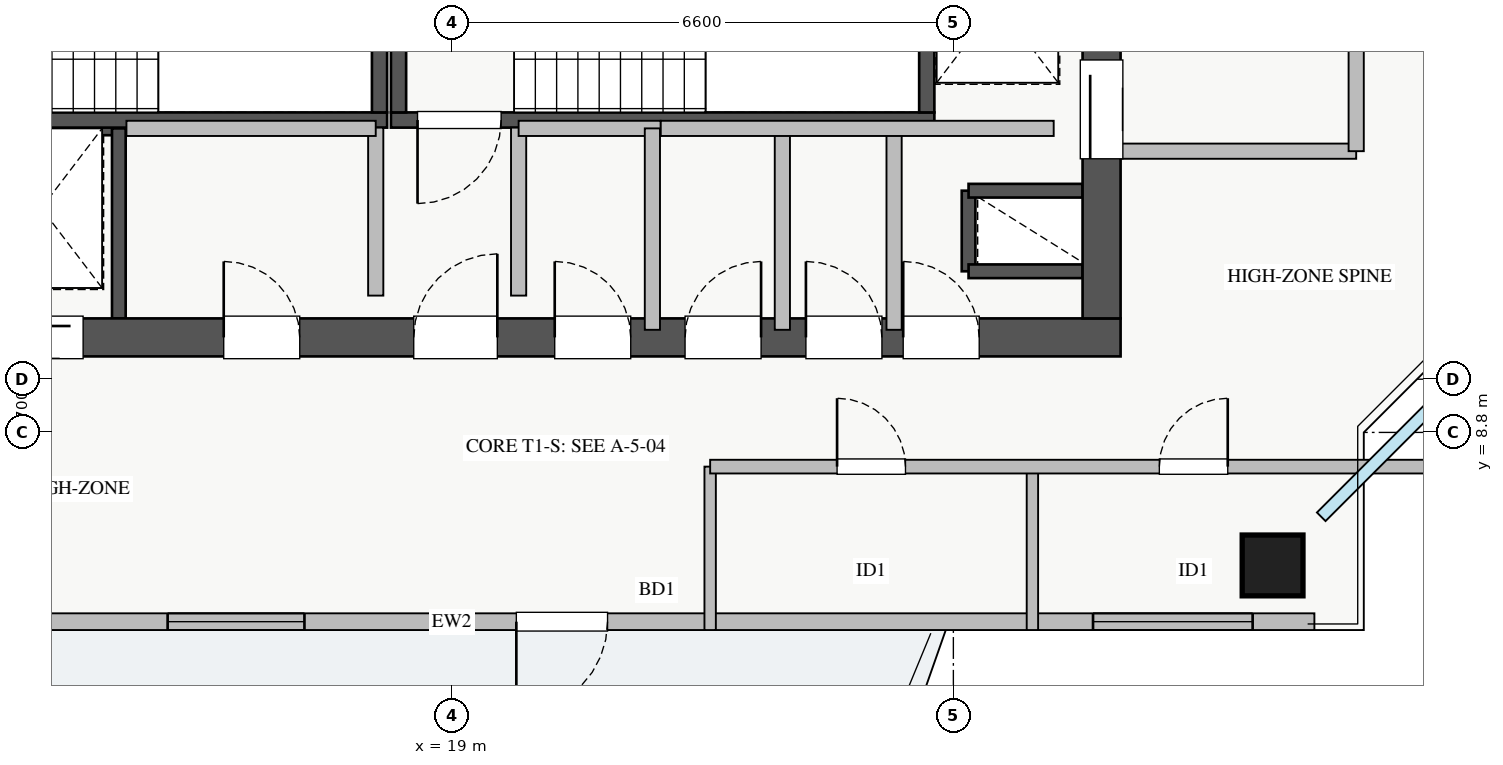
"""IFC4 building model, lengths in metres.
Left out: names, types, materials, properties, quantities, classifications, styles, units other than length and angle.
Written with IfcOpenShell. Run it as: python <this file> out.ifc"""

import sys

from ifc_helpers import new_model, si_unit, direction, frame, frame_2d, origin, origin_2d, place, context, subcontext, project, spatial, rectangle, extrude, source, transform, mapped, element, fill, save


model = new_model("IFC4")
c1 = context("Model", 3, precision=1e-05, world=origin(), true_north=direction((0.0, 1.0)))
c2 = subcontext(c1, "Body", "Model", "MODEL_VIEW")
j1 = project(units=[si_unit("LENGTHUNIT", "METRE"), si_unit("PLANEANGLEUNIT", "RADIAN")], contexts=[c1])
p1 = place(None, origin())
s1 = spatial("IfcSite", under=j1, at=p1, CompositionType="ELEMENT")
p2 = place(p1, origin())
s2 = spatial("IfcBuilding", under=s1, at=p2, CompositionType="ELEMENT")
p3 = place(p2, frame((0.0, 0.0, 223.0)))
s3 = spatial("IfcBuildingStorey", under=s2, at=p3, CompositionType="ELEMENT", Elevation=223.0)
p4 = place(p3, frame((12.68, 12.8, 0.0), z_axis=(0.0, 0.0, 1.0), x_axis=(1.0, 0.0, 0.0)))
e1 = element("IfcWall", 1, at=p4, inside=s3, PredefinedType="SHEAR", context=c2, shape_type="SweptSolid", body=[
    extrude(rectangle(XDim=1.94, YDim=0.18, at=frame_2d((0.97, 0.0))), origin(), (0.0, 0.0, 1.0), 3.07),
])
p5 = place(p3, frame((14.62, 10.3, 0.0), z_axis=(0.0, 0.0, 1.0), x_axis=(0.0, 1.0, 0.0)))
e2 = element("IfcWall", 2, at=p5, inside=s3, PredefinedType="SHEAR", context=c2, shape_type="SweptSolid", body=[
    extrude(rectangle(XDim=2.5, YDim=0.18, at=frame_2d((1.25, 0.0))), origin(), (0.0, 0.0, 1.0), 3.07),
])
p6 = place(p3, frame((25.8, 10.92, 0.0), z_axis=(0.0, 0.0, 1.0), x_axis=(0.0, 1.0, 0.0)))
e3 = element("IfcWall", 3, at=p6, inside=s3, PredefinedType="SHEAR", context=c2, shape_type="SweptSolid", body=[
    extrude(rectangle(XDim=1.06, YDim=0.18, at=frame_2d((0.53, 0.0))), origin(), (0.0, 0.0, 1.0), 3.07),
])
for number, where, z_axis, x_axis in (
    (4, (25.8, 11.98, 0.0), (0.0, 0.0, 1.0), (1.0, 0.0, 0.0)),
    (5, (25.8, 10.92, 0.0), (0.0, 0.0, 1.0), (1.0, 0.0, 0.0)),
):
    element("IfcWall", number, at=place(p3, frame(where, z_axis=z_axis, x_axis=x_axis)), inside=s3, PredefinedType="SHEAR", context=c2, shape_type="SweptSolid", body=[
        extrude(rectangle(XDim=1.5, YDim=0.18, at=frame_2d((0.75, 0.0))), origin(), (0.0, 0.0, 1.0), 3.07),
    ])
p7 = place(p3, frame((10.7, 12.91, 0.0), z_axis=(0.0, 0.0, 1.0), x_axis=(1.0, 0.0, 0.0)))
e6 = element("IfcWall", 6, at=p7, inside=s3, PredefinedType="SHEAR", context=c2, shape_type="SweptSolid", body=[
    extrude(rectangle(XDim=7.45, YDim=0.2, at=frame_2d((3.725, 0.0))), origin(), (0.0, 0.0, 1.0), 3.25),
])
p8 = place(p7, frame((0.35, 0.0, 0.0)))
e7 = element("IfcOpeningElement", 7, at=p8, cuts=e6, PredefinedType="OPENING", context=c2, shape_type="SweptSolid", body=[
    extrude(rectangle(XDim=1.1, YDim=2.05, at=frame_2d((0.55, 1.025))), frame((0.0, 0.11, 0.0), z_axis=(0.0, -1.0, 0.0), x_axis=(1.0, 0.0, 0.0)), (0.0, 0.0, 1.0), 0.22),
])
p9 = place(p3, frame((18.05, 13.01, 0.0), z_axis=(0.0, 0.0, 1.0), x_axis=(0.0, 1.0, 0.0)))
e8 = element("IfcWall", 8, at=p9, inside=s3, PredefinedType="SHEAR", context=c2, shape_type="SweptSolid", body=[
    extrude(rectangle(XDim=2.94, YDim=0.2, at=frame_2d((1.47, 0.0))), origin(), (0.0, 0.0, 1.0), 3.25),
])
p10 = place(p3, frame((18.2, 12.91, 0.0), z_axis=(0.0, 0.0, 1.0), x_axis=(1.0, 0.0, 0.0)))
e9 = element("IfcWall", 9, at=p10, inside=s3, PredefinedType="SHEAR", context=c2, shape_type="SweptSolid", body=[
    extrude(rectangle(XDim=7.15, YDim=0.2, at=frame_2d((3.575, 0.0))), origin(), (0.0, 0.0, 1.0), 3.25),
])
p11 = place(p10, frame((0.35, 0.0, 0.0)))
e10 = element("IfcOpeningElement", 10, at=p11, cuts=e9, PredefinedType="OPENING", context=c2, shape_type="SweptSolid", body=[
    extrude(rectangle(XDim=1.1, YDim=2.05, at=frame_2d((0.55, 1.025))), frame((0.0, 0.11, 0.0), z_axis=(0.0, -1.0, 0.0), x_axis=(1.0, 0.0, 0.0)), (0.0, 0.0, 1.0), 0.22),
])
for number, where, z_axis, x_axis in (
    (11, (18.3, 13.01, 0.0), (0.0, 0.0, 1.0), (0.0, 1.0, 0.0)),
    (12, (25.25, 13.01, 0.0), (0.0, 0.0, 1.0), (0.0, 1.0, 0.0)),
):
    element("IfcWall", number, at=place(p3, frame(where, z_axis=z_axis, x_axis=x_axis)), inside=s3, PredefinedType="SHEAR", context=c2, shape_type="SweptSolid", body=[
        extrude(rectangle(XDim=2.94, YDim=0.2, at=frame_2d((1.47, 0.0))), origin(), (0.0, 0.0, 1.0), 3.25),
    ])
p12 = place(p3, frame((10.2, 10.05, 0.0), z_axis=(0.0, 0.0, 1.0), x_axis=(1.0, 0.0, 0.0)))
e13 = element("IfcWall", 13, at=p12, inside=s3, PredefinedType="SHEAR", context=c2, shape_type="SweptSolid", body=[
    extrude(rectangle(XDim=17.6, YDim=0.5, at=frame_2d((8.8, 0.0))), origin(), (0.0, 0.0, 1.0), 3.25),
])
p13 = place(p12, frame((1.15, 0.0, 0.0)))
e14 = element("IfcOpeningElement", 14, at=p13, cuts=e13, PredefinedType="OPENING", context=c2, shape_type="SweptSolid", body=[
    extrude(rectangle(XDim=1.1, YDim=2.05, at=frame_2d((0.55, 1.025))), frame((0.0, 0.26, 0.0), z_axis=(0.0, -1.0, 0.0), x_axis=(1.0, 0.0, 0.0)), (0.0, 0.0, 1.0), 0.52),
])
p14 = place(p12, frame((8.3, 0.0, 0.0)))
e15 = element("IfcOpeningElement", 15, at=p14, cuts=e13, PredefinedType="OPENING", context=c2, shape_type="SweptSolid", body=[
    extrude(rectangle(XDim=1.1, YDim=2.05, at=frame_2d((0.55, 1.025))), frame((0.0, 0.26, 0.0), z_axis=(0.0, -1.0, 0.0), x_axis=(1.0, 0.0, 0.0)), (0.0, 0.0, 1.0), 0.52),
])
p15 = place(p12, frame((2.85, 0.0, 0.0)))
e16 = element("IfcOpeningElement", 16, at=p15, cuts=e13, PredefinedType="OPENING", context=c2, shape_type="SweptSolid", body=[
    extrude(rectangle(XDim=1.1, YDim=2.05, at=frame_2d((0.55, 1.025))), frame((0.0, 0.26, 0.0), z_axis=(0.0, -1.0, 0.0), x_axis=(1.0, 0.0, 0.0)), (0.0, 0.0, 1.0), 0.52),
])
p16 = place(p12, frame((5.8, 0.0, 0.0)))
e17 = element("IfcOpeningElement", 17, at=p16, cuts=e13, PredefinedType="OPENING", context=c2, shape_type="SweptSolid", body=[
    extrude(rectangle(XDim=1.0, YDim=2.05, at=frame_2d((0.5, 1.025))), frame((0.0, 0.26, 0.0), z_axis=(0.0, -1.0, 0.0), x_axis=(1.0, 0.0, 0.0)), (0.0, 0.0, 1.0), 0.52),
])
p17 = place(p12, frame((14.74, 0.0, 0.0)))
e18 = element("IfcOpeningElement", 18, at=p17, cuts=e13, PredefinedType="OPENING", context=c2, shape_type="SweptSolid", body=[
    extrude(rectangle(XDim=1.0, YDim=2.05, at=frame_2d((0.5, 1.025))), frame((0.0, 0.26, 0.0), z_axis=(0.0, -1.0, 0.0), x_axis=(1.0, 0.0, 0.0)), (0.0, 0.0, 1.0), 0.52),
])
p18 = place(p12, frame((10.155, 0.0, 0.0)))
e19 = element("IfcOpeningElement", 19, at=p18, cuts=e13, PredefinedType="OPENING", context=c2, shape_type="SweptSolid", body=[
    extrude(rectangle(XDim=1.0, YDim=2.05, at=frame_2d((0.5, 1.025))), frame((0.0, 0.26, 0.0), z_axis=(0.0, -1.0, 0.0), x_axis=(1.0, 0.0, 0.0)), (0.0, 0.0, 1.0), 0.52),
])
p19 = place(p12, frame((11.87, 0.0, 0.0)))
e20 = element("IfcOpeningElement", 20, at=p19, cuts=e13, PredefinedType="OPENING", context=c2, shape_type="SweptSolid", body=[
    extrude(rectangle(XDim=1.0, YDim=2.05, at=frame_2d((0.5, 1.025))), frame((0.0, 0.26, 0.0), z_axis=(0.0, -1.0, 0.0), x_axis=(1.0, 0.0, 0.0)), (0.0, 0.0, 1.0), 0.52),
])
p20 = place(p12, frame((13.46, 0.0, 0.0)))
e21 = element("IfcOpeningElement", 21, at=p20, cuts=e13, PredefinedType="OPENING", context=c2, shape_type="SweptSolid", body=[
    extrude(rectangle(XDim=1.0, YDim=2.05, at=frame_2d((0.5, 1.025))), frame((0.0, 0.26, 0.0), z_axis=(0.0, -1.0, 0.0), x_axis=(1.0, 0.0, 0.0)), (0.0, 0.0, 1.0), 0.52),
])
p21 = place(p3, frame((27.55, 10.3, 0.0), z_axis=(0.0, 0.0, 1.0), x_axis=(0.0, 1.0, 0.0)))
e22 = element("IfcWall", 22, at=p21, inside=s3, PredefinedType="SHEAR", context=c2, shape_type="SweptSolid", body=[
    extrude(rectangle(XDim=6.2, YDim=0.5, at=frame_2d((3.1, 0.0))), origin(), (0.0, 0.0, 1.0), 3.25),
])
p22 = place(p21, frame((2.1, 0.0, 0.0)))
e23 = element("IfcOpeningElement", 23, at=p22, cuts=e22, PredefinedType="OPENING", context=c2, shape_type="SweptSolid", body=[
    extrude(rectangle(XDim=1.3, YDim=2.05, at=frame_2d((0.65, 1.025))), frame((0.0, 0.26, 0.0), z_axis=(0.0, -1.0, 0.0), x_axis=(1.0, 0.0, 0.0)), (0.0, 0.0, 1.0), 0.52),
])
m1 = source(origin(), c2, "Body", "SweptSolid", [
    extrude(rectangle(XDim=0.8, YDim=0.8, at=origin_2d()), origin(), (0.0, 0.0, 1.0), 3.25),
])
p23 = place(p3, frame((29.8, 7.05, 0.0), z_axis=(0.0, 0.0, 1.0), x_axis=(1.0, 0.0, 0.0)))
e24 = element("IfcColumn", 24, at=p23, inside=s3, PredefinedType="COLUMN", context=c2, shape_type="MappedRepresentation", body=[
    mapped(m1, transform((0.0, 0.0, 0.0), x_axis=(1.0, 0.0, 0.0), y_axis=(0.0, 1.0, 0.0), z_axis=(0.0, 0.0, 1.0), scale=1.0)),
])
p24 = place(p3, frame((7.65, 6.31, 0.0), z_axis=(0.0, 0.0, 1.0), x_axis=(1.0, 0.0, 0.0)))
e25 = element("IfcWall", 25, at=p24, inside=s3, PredefinedType="STANDARD", context=c2, shape_type="SweptSolid", body=[
    extrude(rectangle(XDim=22.7, YDim=0.22, at=frame_2d((11.35, 0.0))), origin(), (0.0, 0.0, 1.0), 2.61),
])
p25 = place(p24, frame((12.2, 0.0, 0.0)))
e26 = element("IfcOpeningElement", 26, at=p25, cuts=e25, PredefinedType="OPENING", context=c2, shape_type="SweptSolid", body=[
    extrude(rectangle(XDim=1.2, YDim=2.1, at=frame_2d((0.6, 1.05))), frame((0.0, 0.12, 0.0), z_axis=(0.0, -1.0, 0.0), x_axis=(1.0, 0.0, 0.0)), (0.0, 0.0, 1.0), 0.24),
])
p26 = place(p24, frame((1.637, 0.0, 0.9)))
e27 = element("IfcOpeningElement", 27, at=p26, cuts=e25, PredefinedType="OPENING", context=c2, shape_type="SweptSolid", body=[
    extrude(rectangle(XDim=2.4, YDim=1.48, at=frame_2d((1.2, 0.74))), frame((0.0, 0.12, 0.0), z_axis=(0.0, -1.0, 0.0), x_axis=(1.0, 0.0, 0.0)), (0.0, 0.0, 1.0), 0.24),
])
p27 = place(p24, frame((7.612, 0.0, 0.9)))
e28 = element("IfcOpeningElement", 28, at=p27, cuts=e25, PredefinedType="OPENING", context=c2, shape_type="SweptSolid", body=[
    extrude(rectangle(XDim=1.8, YDim=1.45, at=frame_2d((0.9, 0.725))), frame((0.0, 0.12, 0.0), z_axis=(0.0, -1.0, 0.0), x_axis=(1.0, 0.0, 0.0)), (0.0, 0.0, 1.0), 0.24),
])
p28 = place(p24, frame((19.788, 0.0, 0.9)))
e29 = element("IfcOpeningElement", 29, at=p28, cuts=e25, PredefinedType="OPENING", context=c2, shape_type="SweptSolid", body=[
    extrude(rectangle(XDim=2.1, YDim=1.5, at=frame_2d((1.05, 0.75))), frame((0.0, 0.12, 0.0), z_axis=(0.0, -1.0, 0.0), x_axis=(1.0, 0.0, 0.0)), (0.0, 0.0, 1.0), 0.24),
])
p29 = place(p3, frame((27.8, 12.5, 0.0), z_axis=(0.0, 0.0, 1.0), x_axis=(1.0, 0.0, 0.0)))
e30 = element("IfcWall", 30, at=p29, inside=s3, PredefinedType="PARTITIONING", context=c2, shape_type="SweptSolid", body=[
    extrude(rectangle(XDim=3.1, YDim=0.2, at=frame_2d((1.55, 0.0))), origin(), (0.0, 0.0, 1.0), 2.265),
])
p30 = place(p3, frame((30.9, 12.5, 0.0), z_axis=(0.0, 0.0, 1.0), x_axis=(0.0, 1.0, 0.0)))
e31 = element("IfcWall", 31, at=p30, inside=s3, PredefinedType="PARTITIONING", context=c2, shape_type="SweptSolid", body=[
    extrude(rectangle(XDim=3.9, YDim=0.2, at=frame_2d((1.95, 0.0))), origin(), (0.0, 0.0, 1.0), 3.07),
])
p31 = place(p30, frame((1.4, 0.0, 0.0)))
e32 = element("IfcOpeningElement", 32, at=p31, cuts=e31, PredefinedType="OPENING", context=c2, shape_type="SweptSolid", body=[
    extrude(rectangle(XDim=1.1, YDim=2.05, at=frame_2d((0.55, 1.025))), frame((0.0, 0.11, 0.0), z_axis=(0.0, -1.0, 0.0), x_axis=(1.0, 0.0, 0.0)), (0.0, 0.0, 1.0), 0.22),
])
for number, where, z_axis, x_axis in (
    (33, (18.0, 10.6, 0.0), (0.0, 0.0, 1.0), (0.0, 1.0, 0.0)),
    (34, (19.88, 10.6, 0.0), (0.0, 0.0, 1.0), (0.0, 1.0, 0.0)),
):
    element("IfcWall", number, at=place(p3, frame(where, z_axis=z_axis, x_axis=x_axis)), inside=s3, PredefinedType="PARTITIONING", context=c2, shape_type="SweptSolid", body=[
        extrude(rectangle(XDim=2.21, YDim=0.2, at=frame_2d((1.105, 0.0))), origin(), (0.0, 0.0, 1.0), 3.07),
    ])
p32 = place(p3, frame((14.72, 12.8, 0.0), z_axis=(0.0, 0.0, 1.0), x_axis=(1.0, 0.0, 0.0)))
e35 = element("IfcWall", 35, at=p32, inside=s3, PredefinedType="PARTITIONING", context=c2, shape_type="SweptSolid", body=[
    extrude(rectangle(XDim=3.28, YDim=0.2, at=frame_2d((1.64, 0.0))), origin(), (0.0, 0.0, 1.0), 3.07),
])
p33 = place(p3, frame((24.82, 10.15, 0.0), z_axis=(0.0, 0.0, 1.0), x_axis=(0.0, 1.0, 0.0)))
e36 = element("IfcWall", 36, at=p33, inside=s3, PredefinedType="PARTITIONING", context=c2, shape_type="SweptSolid", body=[
    extrude(rectangle(XDim=2.65, YDim=0.2, at=frame_2d((1.325, 0.0))), origin(), (0.0, 0.0, 1.0), 3.07),
])
p34 = place(p3, frame((19.88, 12.8, 0.0), z_axis=(0.0, 0.0, 1.0), x_axis=(1.0, 0.0, 0.0)))
e37 = element("IfcWall", 37, at=p34, inside=s3, PredefinedType="PARTITIONING", context=c2, shape_type="SweptSolid", body=[
    extrude(rectangle(XDim=1.87, YDim=0.2, at=frame_2d((0.935, 0.0))), origin(), (0.0, 0.0, 1.0), 3.07),
])
for number, where, z_axis, x_axis in (
    (38, (21.64, 10.15, 0.0), (0.0, 0.0, 1.0), (0.0, 1.0, 0.0)),
    (39, (23.35, 10.15, 0.0), (0.0, 0.0, 1.0), (0.0, 1.0, 0.0)),
):
    element("IfcWall", number, at=place(p3, frame(where, z_axis=z_axis, x_axis=x_axis)), inside=s3, PredefinedType="PARTITIONING", context=c2, shape_type="SweptSolid", body=[
        extrude(rectangle(XDim=2.65, YDim=0.2, at=frame_2d((1.325, 0.0))), origin(), (0.0, 0.0, 1.0), 3.07),
    ])
p35 = place(p3, frame((21.75, 12.8, 0.0), z_axis=(0.0, 0.0, 1.0), x_axis=(1.0, 0.0, 0.0)))
e40 = element("IfcWall", 40, at=p35, inside=s3, PredefinedType="PARTITIONING", context=c2, shape_type="SweptSolid", body=[
    extrude(rectangle(XDim=5.17, YDim=0.2, at=frame_2d((2.585, 0.0))), origin(), (0.0, 0.0, 1.0), 3.07),
])
for number, where, z_axis, x_axis in (
    (41, (22.4, 6.2, 0.0), (0.0, 0.0, 1.0), (0.0, 1.0, 0.0)),
    (42, (26.64, 6.2, 0.0), (0.0, 0.0, 1.0), (0.0, 1.0, 0.0)),
):
    element("IfcWall", number, at=place(p3, frame(where, z_axis=z_axis, x_axis=x_axis)), inside=s3, PredefinedType="PARTITIONING", context=c2, shape_type="SweptSolid", body=[
        extrude(rectangle(XDim=2.15, YDim=0.15, at=frame_2d((1.075, 0.0))), origin(), (0.0, 0.0, 1.0), 3.07),
    ])
p36 = place(p3, frame((22.4, 8.35, 0.0), z_axis=(0.0, 0.0, 1.0), x_axis=(1.0, 0.0, 0.0)))
e43 = element("IfcWall", 43, at=p36, inside=s3, PredefinedType="PARTITIONING", context=c2, shape_type="SweptSolid", body=[
    extrude(rectangle(XDim=10.05, YDim=0.18, at=frame_2d((5.025, 0.0))), origin(), (0.0, 0.0, 1.0), 3.07),
])
p37 = place(p36, frame((1.67, 0.0, 0.0)))
e44 = element("IfcOpeningElement", 44, at=p37, cuts=e43, PredefinedType="OPENING", context=c2, shape_type="SweptSolid", body=[
    extrude(rectangle(XDim=0.9, YDim=2.05, at=frame_2d((0.45, 1.025))), frame((0.0, 0.1, 0.0), z_axis=(0.0, -1.0, 0.0), x_axis=(1.0, 0.0, 0.0)), (0.0, 0.0, 1.0), 0.2),
])
p38 = place(p36, frame((5.91, 0.0, 0.0)))
e45 = element("IfcOpeningElement", 45, at=p38, cuts=e43, PredefinedType="OPENING", context=c2, shape_type="SweptSolid", body=[
    extrude(rectangle(XDim=0.9, YDim=2.05, at=frame_2d((0.45, 1.025))), frame((0.0, 0.1, 0.0), z_axis=(0.0, -1.0, 0.0), x_axis=(1.0, 0.0, 0.0)), (0.0, 0.0, 1.0), 0.2),
])
m2 = source(origin(), c2, "Body", "SweptSolid", [
    extrude(rectangle(XDim=1.2, YDim=2.1, at=frame_2d((0.6, 1.05))), frame((0.0, 0.025, 0.0), z_axis=(0.0, -1.0, 0.0), x_axis=(1.0, 0.0, 0.0)), (0.0, 0.0, 1.0), 0.05),
])
p39 = place(p25, frame((1.2, 0.0, 0.0), z_axis=(0.0, 0.0, 1.0), x_axis=(-1.0, 0.0, 0.0)))
e46 = element("IfcDoor", 46, at=p39, inside=s3, OperationType="SINGLE_SWING_LEFT", PredefinedType="DOOR", context=c2, shape_type="MappedRepresentation", body=[
    mapped(m2, transform((0.0, 0.0, 0.0), x_axis=(1.0, 0.0, 0.0), y_axis=(0.0, 1.0, 0.0), z_axis=(0.0, 0.0, 1.0), scale=1.0)),
])
fill(e26, e46)
m3 = source(origin(), c2, "Body", "SweptSolid", [
    extrude(rectangle(XDim=1.8, YDim=1.45, at=frame_2d((0.9, 0.725))), frame((0.0, 0.03, 0.0), z_axis=(0.0, -1.0, 0.0), x_axis=(1.0, 0.0, 0.0)), (0.0, 0.0, 1.0), 0.06),
])
p40 = place(p27, origin())
e47 = element("IfcWindow", 47, at=p40, inside=s3, PartitioningType="DOUBLE_PANEL_VERTICAL", PredefinedType="WINDOW", context=c2, shape_type="MappedRepresentation", body=[
    mapped(m3, transform((0.0, 0.0, 0.0), x_axis=(1.0, 0.0, 0.0), y_axis=(0.0, 1.0, 0.0), z_axis=(0.0, 0.0, 1.0), scale=1.0)),
])
fill(e28, e47)
m4 = source(origin(), c2, "Body", "SweptSolid", [
    extrude(rectangle(XDim=2.1, YDim=1.5, at=frame_2d((1.05, 0.75))), frame((0.0, 0.03, 0.0), z_axis=(0.0, -1.0, 0.0), x_axis=(1.0, 0.0, 0.0)), (0.0, 0.0, 1.0), 0.06),
])
p41 = place(p28, origin())
e48 = element("IfcWindow", 48, at=p41, inside=s3, PartitioningType="TRIPLE_PANEL_VERTICAL", PredefinedType="WINDOW", context=c2, shape_type="MappedRepresentation", body=[
    mapped(m4, transform((0.0, 0.0, 0.0), x_axis=(1.0, 0.0, 0.0), y_axis=(0.0, 1.0, 0.0), z_axis=(0.0, 0.0, 1.0), scale=1.0)),
])
fill(e29, e48)
m5 = source(origin(), c2, "Body", "SweptSolid", [
    extrude(rectangle(XDim=1.3, YDim=2.05, at=frame_2d((0.65, 1.025))), frame((0.0, 0.025, 0.0), z_axis=(0.0, -1.0, 0.0), x_axis=(1.0, 0.0, 0.0)), (0.0, 0.0, 1.0), 0.05),
])
p42 = place(p22, origin())
e49 = element("IfcDoor", 49, at=p42, inside=s3, OperationType="SLIDING_TO_RIGHT", PredefinedType="DOOR", context=c2, shape_type="MappedRepresentation", body=[
    mapped(m5, transform((0.0, 0.0, 0.0), x_axis=(1.0, 0.0, 0.0), y_axis=(0.0, 1.0, 0.0), z_axis=(0.0, 0.0, 1.0), scale=1.0)),
])
fill(e23, e49)
m6 = source(origin(), c2, "Body", "SweptSolid", [
    extrude(rectangle(XDim=1.1, YDim=2.05, at=frame_2d((0.55, 1.025))), frame((0.0, 0.025, 0.0), z_axis=(0.0, -1.0, 0.0), x_axis=(1.0, 0.0, 0.0)), (0.0, 0.0, 1.0), 0.05),
])
p43 = place(p14, origin())
e50 = element("IfcDoor", 50, at=p43, inside=s3, OperationType="SINGLE_SWING_RIGHT", PredefinedType="DOOR", context=c2, shape_type="MappedRepresentation", body=[
    mapped(m6, transform((0.0, 0.0, 0.0), x_axis=(1.0, 0.0, 0.0), y_axis=(0.0, 1.0, 0.0), z_axis=(0.0, 0.0, 1.0), scale=1.0)),
])
fill(e15, e50)
p44 = place(p11, frame((1.1, 0.0, 0.0), z_axis=(0.0, 0.0, 1.0), x_axis=(-1.0, 0.0, 0.0)))
e51 = element("IfcDoor", 51, at=p44, inside=s3, OperationType="SINGLE_SWING_LEFT", PredefinedType="DOOR", context=c2, shape_type="MappedRepresentation", body=[
    mapped(m6, transform((0.0, 0.0, 0.0), x_axis=(1.0, 0.0, 0.0), y_axis=(0.0, 1.0, 0.0), z_axis=(0.0, 0.0, 1.0), scale=1.0)),
])
fill(e10, e51)
p45 = place(p15, origin())
e52 = element("IfcDoor", 52, at=p45, inside=s3, OperationType="SLIDING_TO_RIGHT", PredefinedType="DOOR", context=c2, shape_type="MappedRepresentation", body=[
    mapped(m6, transform((0.0, 0.0, 0.0), x_axis=(1.0, 0.0, 0.0), y_axis=(0.0, 1.0, 0.0), z_axis=(0.0, 0.0, 1.0), scale=1.0)),
])
fill(e16, e52)
m7 = source(origin(), c2, "Body", "SweptSolid", [
    extrude(rectangle(XDim=1.0, YDim=2.05, at=frame_2d((0.5, 1.025))), frame((0.0, 0.025, 0.0), z_axis=(0.0, -1.0, 0.0), x_axis=(1.0, 0.0, 0.0)), (0.0, 0.0, 1.0), 0.05),
])
p46 = place(p16, origin())
e53 = element("IfcDoor", 53, at=p46, inside=s3, OperationType="SINGLE_SWING_LEFT", PredefinedType="DOOR", context=c2, shape_type="MappedRepresentation", body=[
    mapped(m7, transform((0.0, 0.0, 0.0), x_axis=(1.0, 0.0, 0.0), y_axis=(0.0, 1.0, 0.0), z_axis=(0.0, 0.0, 1.0), scale=1.0)),
])
fill(e17, e53)
p47 = place(p17, origin())
e54 = element("IfcDoor", 54, at=p47, inside=s3, OperationType="SINGLE_SWING_LEFT", PredefinedType="DOOR", context=c2, shape_type="MappedRepresentation", body=[
    mapped(m7, transform((0.0, 0.0, 0.0), x_axis=(1.0, 0.0, 0.0), y_axis=(0.0, 1.0, 0.0), z_axis=(0.0, 0.0, 1.0), scale=1.0)),
])
fill(e18, e54)
p48 = place(p18, origin())
e55 = element("IfcDoor", 55, at=p48, inside=s3, OperationType="SINGLE_SWING_LEFT", PredefinedType="DOOR", context=c2, shape_type="MappedRepresentation", body=[
    mapped(m7, transform((0.0, 0.0, 0.0), x_axis=(1.0, 0.0, 0.0), y_axis=(0.0, 1.0, 0.0), z_axis=(0.0, 0.0, 1.0), scale=1.0)),
])
fill(e19, e55)
p49 = place(p19, origin())
e56 = element("IfcDoor", 56, at=p49, inside=s3, OperationType="SINGLE_SWING_RIGHT", PredefinedType="DOOR", context=c2, shape_type="MappedRepresentation", body=[
    mapped(m7, transform((0.0, 0.0, 0.0), x_axis=(1.0, 0.0, 0.0), y_axis=(0.0, 1.0, 0.0), z_axis=(0.0, 0.0, 1.0), scale=1.0)),
])
fill(e20, e56)
p50 = place(p20, origin())
e57 = element("IfcDoor", 57, at=p50, inside=s3, OperationType="SINGLE_SWING_LEFT", PredefinedType="DOOR", context=c2, shape_type="MappedRepresentation", body=[
    mapped(m7, transform((0.0, 0.0, 0.0), x_axis=(1.0, 0.0, 0.0), y_axis=(0.0, 1.0, 0.0), z_axis=(0.0, 0.0, 1.0), scale=1.0)),
])
fill(e21, e57)
m8 = source(origin(), c2, "Body", "SweptSolid", [
    extrude(rectangle(XDim=0.9, YDim=2.05, at=frame_2d((0.45, 1.025))), frame((0.0, 0.025, 0.0), z_axis=(0.0, -1.0, 0.0), x_axis=(1.0, 0.0, 0.0)), (0.0, 0.0, 1.0), 0.05),
])
p51 = place(p37, origin())
e58 = element("IfcDoor", 58, at=p51, inside=s3, OperationType="SINGLE_SWING_LEFT", PredefinedType="DOOR", context=c2, shape_type="MappedRepresentation", body=[
    mapped(m8, transform((0.0, 0.0, 0.0), x_axis=(1.0, 0.0, 0.0), y_axis=(0.0, 1.0, 0.0), z_axis=(0.0, 0.0, 1.0), scale=1.0)),
])
fill(e44, e58)
p52 = place(p38, origin())
e59 = element("IfcDoor", 59, at=p52, inside=s3, OperationType="SINGLE_SWING_RIGHT", PredefinedType="DOOR", context=c2, shape_type="MappedRepresentation", body=[
    mapped(m8, transform((0.0, 0.0, 0.0), x_axis=(1.0, 0.0, 0.0), y_axis=(0.0, 1.0, 0.0), z_axis=(0.0, 0.0, 1.0), scale=1.0)),
])
fill(e45, e59)
save(model, sys.argv[1])
